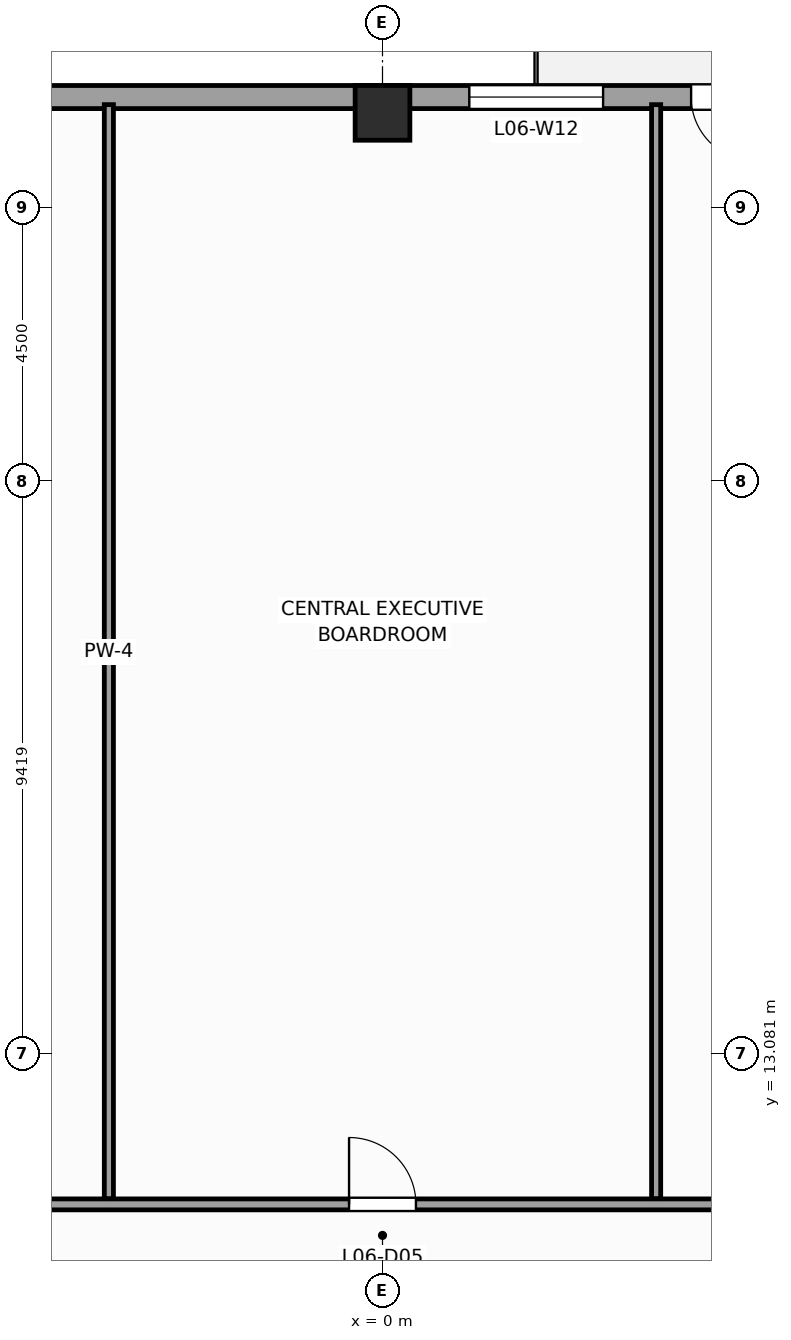
"""IFC4 building model, lengths in metres.
Left out: names, types, materials, properties, quantities, classifications, styles, units other than length and angle.
Written with IfcOpenShell. Run it as: python <this file> out.ifc"""

import sys

from ifc_helpers import new_model, si_unit, direction, frame, frame_2d, origin, origin_2d, place, context, subcontext, project, spatial, rectangle, extrude, source, transform, mapped, element, fill, save


model = new_model("IFC4")
c1 = context("Model", 3, precision=1e-05, world=origin(), true_north=direction((0.0, 1.0)))
c2 = subcontext(c1, "Body", "Model", "MODEL_VIEW")
j1 = project(units=[si_unit("LENGTHUNIT", "METRE"), si_unit("PLANEANGLEUNIT", "RADIAN")], contexts=[c1])
p1 = place(None, origin())
s1 = spatial("IfcSite", under=j1, at=p1, CompositionType="ELEMENT")
p2 = place(p1, origin())
s2 = spatial("IfcBuilding", under=s1, at=p2, CompositionType="ELEMENT")
p3 = place(p2, frame((0.0, 0.0, 30.0)))
s3 = spatial("IfcBuildingStorey", under=s2, at=p3, CompositionType="ELEMENT", Elevation=30.0)
m1 = source(origin(), c2, "Body", "SweptSolid", [
    extrude(rectangle(XDim=0.9, YDim=0.9, at=origin_2d()), origin(), (0.0, 0.0, 1.0), 4.0),
])
p4 = place(p3, frame((0.0, 28.55, 0.0), z_axis=(0.0, 0.0, 1.0), x_axis=(1.0, 0.0, 0.0)))
e1 = element("IfcColumn", 1, at=p4, inside=s3, PredefinedType="COLUMN", context=c2, shape_type="MappedRepresentation", body=[
    mapped(m1, transform((0.0, 0.0, 0.0), scale=1.0)),
])
p5 = place(p3, frame((25.69, 28.81, 0.0), z_axis=(0.0, 0.0, 1.0), x_axis=(-1.0, 0.0, 0.0)))
e2 = element("IfcWall", 2, at=p5, inside=s3, PredefinedType="STANDARD", context=c2, shape_type="SweptSolid", body=[
    extrude(rectangle(XDim=51.38, YDim=0.38, at=frame_2d((25.69, 0.0))), origin(), (0.0, 0.0, 1.0), 3.12),
])
p6 = place(p5, frame((19.565, 0.0, 0.0)))
e3 = element("IfcOpeningElement", 3, at=p6, cuts=e2, PredefinedType="OPENING", context=c2, shape_type="SweptSolid", body=[
    extrude(rectangle(XDim=1.05, YDim=2.25, at=frame_2d((0.525, 1.125))), frame((0.0, 0.2, 0.0), z_axis=(0.0, -1.0, 0.0), x_axis=(1.0, 0.0, 0.0)), (0.0, 0.0, 1.0), 0.4),
])
p7 = place(p5, frame((5.466, 0.0, 0.49)))
e4 = element("IfcOpeningElement", 4, at=p7, cuts=e2, PredefinedType="OPENING", context=c2, shape_type="SweptSolid", body=[
    extrude(rectangle(XDim=1.4, YDim=2.4, at=frame_2d((0.7, 1.2))), frame((0.0, 0.2, 0.0), z_axis=(0.0, -1.0, 0.0), x_axis=(1.0, 0.0, 0.0)), (0.0, 0.0, 1.0), 0.4),
])
p8 = place(p5, frame((13.8, 0.0, 0.49)))
e5 = element("IfcOpeningElement", 5, at=p8, cuts=e2, PredefinedType="OPENING", context=c2, shape_type="SweptSolid", body=[
    extrude(rectangle(XDim=2.2, YDim=2.4, at=frame_2d((1.1, 1.2))), frame((0.0, 0.2, 0.0), z_axis=(0.0, -1.0, 0.0), x_axis=(1.0, 0.0, 0.0)), (0.0, 0.0, 1.0), 0.4),
])
p9 = place(p5, frame((22.062, 0.0, 0.49)))
e6 = element("IfcOpeningElement", 6, at=p9, cuts=e2, PredefinedType="OPENING", context=c2, shape_type="SweptSolid", body=[
    extrude(rectangle(XDim=2.2, YDim=2.4, at=frame_2d((1.1, 1.2))), frame((0.0, 0.2, 0.0), z_axis=(0.0, -1.0, 0.0), x_axis=(1.0, 0.0, 0.0)), (0.0, 0.0, 1.0), 0.4),
])
p10 = place(p5, frame((33.838, 0.0, 0.49)))
e7 = element("IfcOpeningElement", 7, at=p10, cuts=e2, PredefinedType="OPENING", context=c2, shape_type="SweptSolid", body=[
    extrude(rectangle(XDim=2.2, YDim=2.4, at=frame_2d((1.1, 1.2))), frame((0.0, 0.2, 0.0), z_axis=(0.0, -1.0, 0.0), x_axis=(1.0, 0.0, 0.0)), (0.0, 0.0, 1.0), 0.4),
])
p11 = place(p5, frame((43.487, 0.0, 0.49)))
e8 = element("IfcOpeningElement", 8, at=p11, cuts=e2, PredefinedType="OPENING", context=c2, shape_type="SweptSolid", body=[
    extrude(rectangle(XDim=1.4, YDim=2.4, at=frame_2d((0.7, 1.2))), frame((0.0, 0.2, 0.0), z_axis=(0.0, -1.0, 0.0), x_axis=(1.0, 0.0, 0.0)), (0.0, 0.0, 1.0), 0.4),
])
p12 = place(p3, frame((-10.6, 10.6, 0.0), z_axis=(0.0, 0.0, 1.0), x_axis=(1.0, 0.0, 0.0)))
e9 = element("IfcWall", 9, at=p12, inside=s3, PredefinedType="PARTITIONING", context=c2, shape_type="SweptSolid", body=[
    extrude(rectangle(XDim=21.2, YDim=0.18, at=frame_2d((10.6, 0.0))), origin(), (0.0, 0.0, 1.0), 3.72),
])
p13 = place(p12, frame((10.05, 0.0, 0.0)))
e10 = element("IfcOpeningElement", 10, at=p13, cuts=e9, PredefinedType="OPENING", context=c2, shape_type="SweptSolid", body=[
    extrude(rectangle(XDim=1.1, YDim=2.2, at=frame_2d((0.55, 1.1))), frame((0.0, 0.1, 0.0), z_axis=(0.0, -1.0, 0.0), x_axis=(1.0, 0.0, 0.0)), (0.0, 0.0, 1.0), 0.2),
])
for number, where, z_axis, x_axis in (
    (11, (-4.5, 10.695, 0.0), (0.0, 0.0, 1.0), (0.0, 1.0, 0.0)),
    (12, (4.5, 10.695, 0.0), (0.0, 0.0, 1.0), (0.0, 1.0, 0.0)),
):
    element("IfcWall", number, at=place(p3, frame(where, z_axis=z_axis, x_axis=x_axis)), inside=s3, PredefinedType="PARTITIONING", context=c2, shape_type="SweptSolid", body=[
        extrude(rectangle(XDim=17.99, YDim=0.15, at=frame_2d((8.995, 0.0))), origin(), (0.0, 0.0, 1.0), 3.72),
    ])
m2 = source(origin(), c2, "Body", "SweptSolid", [
    extrude(rectangle(XDim=1.05, YDim=2.25, at=frame_2d((0.525, 1.125))), frame((0.0, 0.025, 0.0), z_axis=(0.0, -1.0, 0.0), x_axis=(1.0, 0.0, 0.0)), (0.0, 0.0, 1.0), 0.05),
])
p14 = place(p6, origin())
e13 = element("IfcDoor", 13, at=p14, inside=s3, OperationType="SINGLE_SWING_LEFT", PredefinedType="DOOR", context=c2, shape_type="MappedRepresentation", body=[
    mapped(m2, transform((0.0, 0.0, 0.0), scale=1.0)),
])
fill(e3, e13)
m3 = source(origin(), c2, "Body", "SweptSolid", [
    extrude(rectangle(XDim=2.2, YDim=2.4, at=frame_2d((1.1, 1.2))), frame((0.0, 0.03, 0.0), z_axis=(0.0, -1.0, 0.0), x_axis=(1.0, 0.0, 0.0)), (0.0, 0.0, 1.0), 0.06),
])
p15 = place(p9, origin())
e14 = element("IfcWindow", 14, at=p15, inside=s3, PartitioningType="SINGLE_PANEL", PredefinedType="WINDOW", context=c2, shape_type="MappedRepresentation", body=[
    mapped(m3, transform((0.0, 0.0, 0.0), scale=1.0)),
])
fill(e6, e14)
m4 = source(origin(), c2, "Body", "SweptSolid", [
    extrude(rectangle(XDim=1.1, YDim=2.2, at=frame_2d((0.55, 1.1))), frame((0.0, 0.025, 0.0), z_axis=(0.0, -1.0, 0.0), x_axis=(1.0, 0.0, 0.0)), (0.0, 0.0, 1.0), 0.05),
])
p16 = place(p13, origin())
e15 = element("IfcDoor", 15, at=p16, inside=s3, OperationType="SINGLE_SWING_LEFT", PredefinedType="DOOR", context=c2, shape_type="MappedRepresentation", body=[
    mapped(m4, transform((0.0, 0.0, 0.0), scale=1.0)),
])
fill(e10, e15)
save(model, sys.argv[1])
